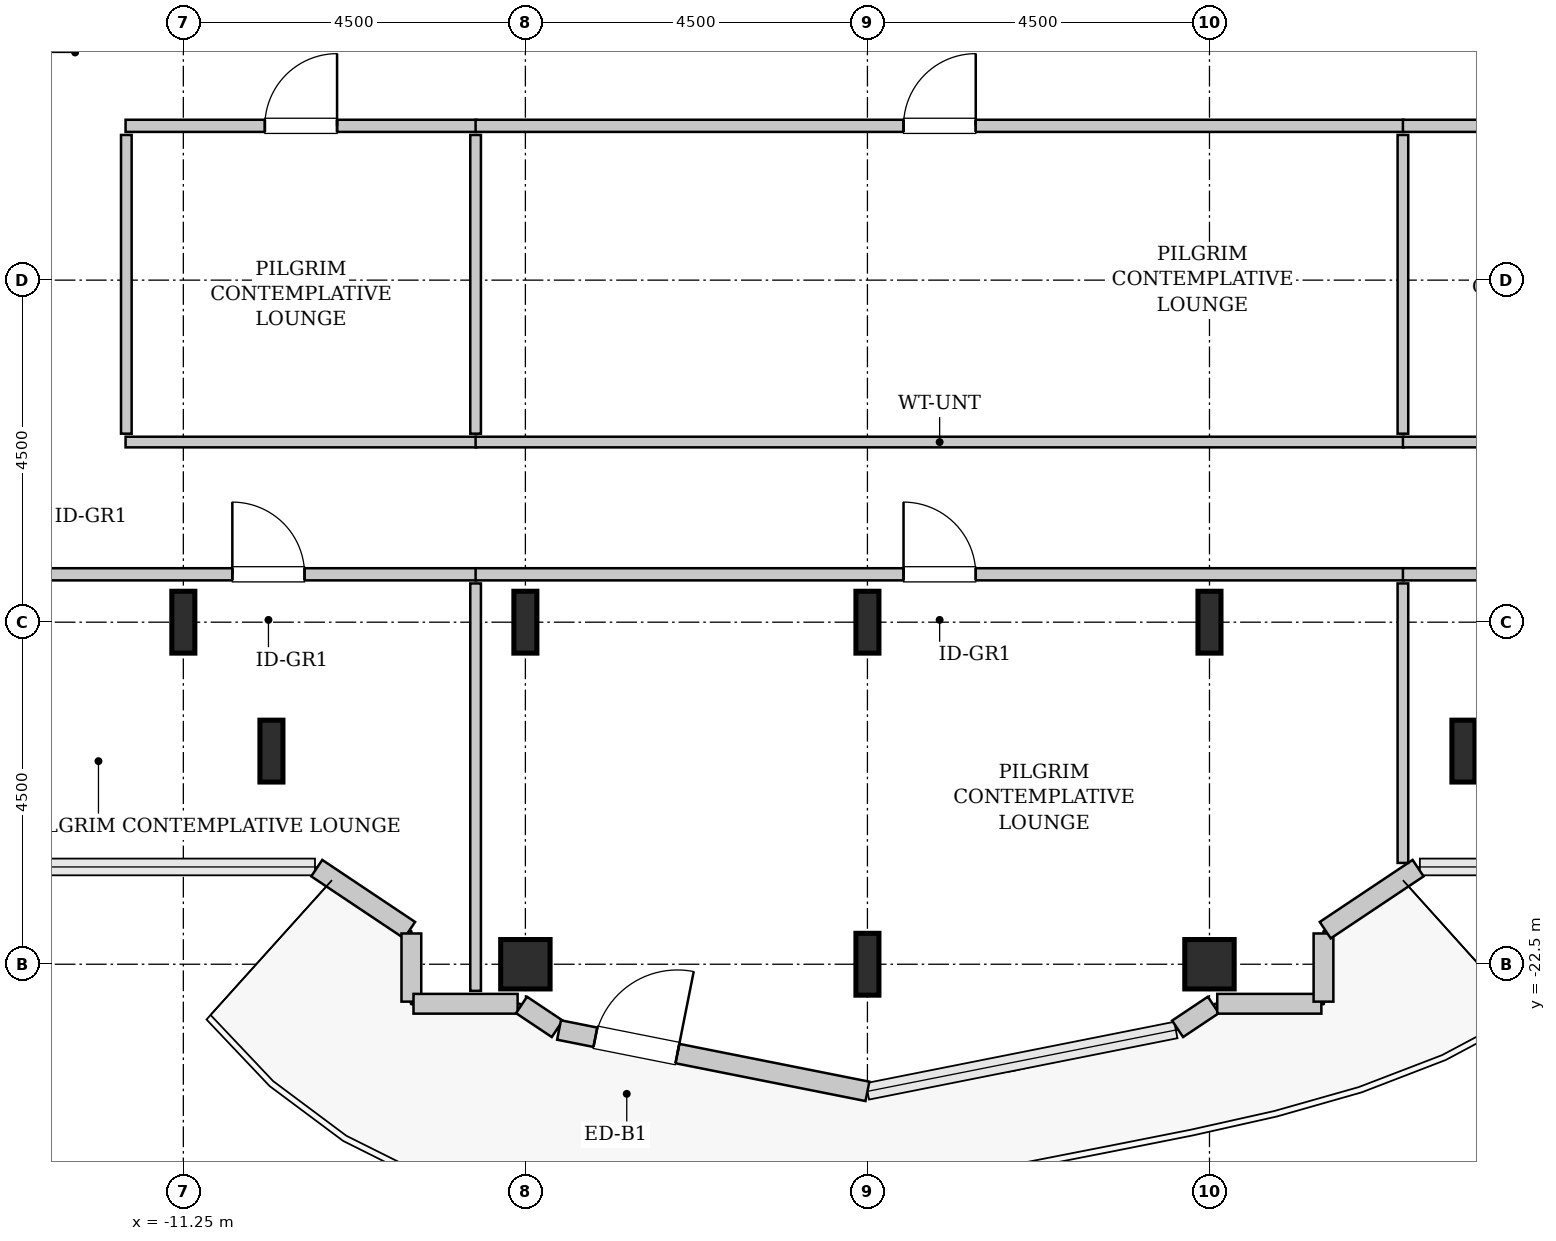
"""IFC4 building model, lengths in metres.
Left out: names, types, materials, properties, quantities, classifications, styles, units other than length and angle.
Written with IfcOpenShell. Run it as: python <this file> out.ifc"""

import sys

from ifc_helpers import new_model, si_unit, direction, frame, frame_2d, origin, origin_2d, place, context, subcontext, project, spatial, rectangle, hollow_rectangle, i_section, extrude, source, transform, mapped, element, fill, save


model = new_model("IFC4")
c1 = context("Model", 3, precision=1e-05, world=origin(), true_north=direction((0.0, 1.0)))
c2 = subcontext(c1, "Body", "Model", "MODEL_VIEW")
j1 = project(units=[si_unit("LENGTHUNIT", "METRE"), si_unit("PLANEANGLEUNIT", "RADIAN")], contexts=[c1])
p1 = place(None, origin())
s1 = spatial("IfcSite", under=j1, at=p1, CompositionType="ELEMENT")
p2 = place(p1, origin())
s2 = spatial("IfcBuilding", under=s1, at=p2, CompositionType="ELEMENT")
p3 = place(p2, frame((0.0, 0.0, 248.4)))
s3 = spatial("IfcBuildingStorey", under=s2, at=p3, CompositionType="ELEMENT", Elevation=248.4)
m1 = source(origin(), c2, "Body", "SweptSolid", [
    extrude(i_section(OverallWidth=0.303, OverallDepth=0.814, WebThickness=0.021, FlangeThickness=0.04, FilletRadius=0.03, at=origin_2d()), origin(), (0.0, 0.0, 1.0), 3.8),
])
for number, where, z_axis, x_axis in (
    (1, (-11.25, -18.0, 0.0), (0.0, 0.0, 1.0), (1.0, 0.0, 0.0)),
    (2, (-10.091, -19.696, 0.0), (0.0, 0.0, 1.0), (1.0, 0.0, 0.0)),
):
    element("IfcColumn", number, at=place(p3, frame(where, z_axis=z_axis, x_axis=x_axis)), inside=s3, PredefinedType="COLUMN", context=c2, shape_type="MappedRepresentation", body=[
        mapped(m1, transform((0.0, 0.0, 0.0), x_axis=(1.0, 0.0, 0.0), y_axis=(0.0, 1.0, 0.0), z_axis=(0.0, 0.0, 1.0), scale=1.0)),
    ])
m2 = source(origin(), c2, "Body", "SweptSolid", [
    extrude(hollow_rectangle(XDim=0.65, YDim=0.65, WallThickness=0.032, InnerFilletRadius=0.032, OuterFilletRadius=0.064, at=origin_2d()), origin(), (0.0, 0.0, 1.0), 3.8),
])
p4 = place(p3, frame((-6.75, -22.5, 0.0), z_axis=(0.0, 0.0, 1.0), x_axis=(1.0, 0.0, 0.0)))
e3 = element("IfcColumn", 3, at=p4, inside=s3, PredefinedType="COLUMN", context=c2, shape_type="MappedRepresentation", body=[
    mapped(m2, transform((0.0, 0.0, 0.0), x_axis=(1.0, 0.0, 0.0), y_axis=(0.0, 1.0, 0.0), z_axis=(0.0, 0.0, 1.0), scale=1.0)),
])
for number, where, z_axis, x_axis in (
    (4, (-6.75, -18.0, 0.0), (0.0, 0.0, 1.0), (1.0, 0.0, 0.0)),
    (5, (-2.25, -22.5, 0.0), (0.0, 0.0, 1.0), (1.0, 0.0, 0.0)),
    (6, (-2.25, -18.0, 0.0), (0.0, 0.0, 1.0), (1.0, 0.0, 0.0)),
):
    element("IfcColumn", number, at=place(p3, frame(where, z_axis=z_axis, x_axis=x_axis)), inside=s3, PredefinedType="COLUMN", context=c2, shape_type="MappedRepresentation", body=[
        mapped(m1, transform((0.0, 0.0, 0.0), x_axis=(1.0, 0.0, 0.0), y_axis=(0.0, 1.0, 0.0), z_axis=(0.0, 0.0, 1.0), scale=1.0)),
    ])
p5 = place(p3, frame((2.25, -22.5, 0.0), z_axis=(0.0, 0.0, 1.0), x_axis=(1.0, 0.0, 0.0)))
e7 = element("IfcColumn", 7, at=p5, inside=s3, PredefinedType="COLUMN", context=c2, shape_type="MappedRepresentation", body=[
    mapped(m2, transform((0.0, 0.0, 0.0), x_axis=(1.0, 0.0, 0.0), y_axis=(0.0, 1.0, 0.0), z_axis=(0.0, 0.0, 1.0), scale=1.0)),
])
for number, where, z_axis, x_axis in (
    (8, (2.25, -18.0, 0.0), (0.0, 0.0, 1.0), (1.0, 0.0, 0.0)),
    (9, (5.591, -19.696, 0.0), (0.0, 0.0, 1.0), (1.0, 0.0, 0.0)),
):
    element("IfcColumn", number, at=place(p3, frame(where, z_axis=z_axis, x_axis=x_axis)), inside=s3, PredefinedType="COLUMN", context=c2, shape_type="MappedRepresentation", body=[
        mapped(m1, transform((0.0, 0.0, 0.0), x_axis=(1.0, 0.0, 0.0), y_axis=(0.0, 1.0, 0.0), z_axis=(0.0, 0.0, 1.0), scale=1.0)),
    ])
m3 = source(origin(), c2, "Body", "SweptSolid", [
    extrude(rectangle(XDim=1.469, YDim=0.26, at=frame_2d((0.734, 0.0))), origin(), (0.0, 0.0, 1.0), 3.55),
])
p6 = place(p3, frame((-9.495, -21.236, 0.0), z_axis=(0.0, 0.0, 1.0), x_axis=(0.831461760506, -0.555581983884, 0.0)))
e10 = element("IfcWall", 10, at=p6, inside=s3, PredefinedType="SOLIDWALL", context=c2, shape_type="MappedRepresentation", body=[
    mapped(m3, transform((0.0, 0.0, 0.0), x_axis=(1.0, 0.0, 0.0), y_axis=(0.0, 1.0, 0.0), z_axis=(0.0, 0.0, 1.0), scale=1.0)),
])
m4 = source(origin(), c2, "Body", "SweptSolid", [
    extrude(rectangle(XDim=0.897, YDim=0.26, at=frame_2d((0.448, 0.0))), origin(), (0.0, 0.0, 1.0), 3.55),
])
p7 = place(p3, frame((-8.25, -22.095, 0.0), z_axis=(0.0, 0.0, 1.0), x_axis=(0.0, -1.0, 0.0)))
e11 = element("IfcWall", 11, at=p7, inside=s3, PredefinedType="SOLIDWALL", context=c2, shape_type="MappedRepresentation", body=[
    mapped(m4, transform((0.0, 0.0, 0.0), x_axis=(1.0, 0.0, 0.0), y_axis=(0.0, 1.0, 0.0), z_axis=(0.0, 0.0, 1.0), scale=1.0)),
])
m5 = source(origin(), c2, "Body", "SweptSolid", [
    extrude(rectangle(XDim=1.37, YDim=0.26, at=frame_2d((0.685, 0.0))), origin(), (0.0, 0.0, 1.0), 3.55),
])
p8 = place(p3, frame((-8.222, -23.02, 0.0), z_axis=(0.0, 0.0, 1.0), x_axis=(1.0, 0.0, 0.0)))
e12 = element("IfcWall", 12, at=p8, inside=s3, PredefinedType="SOLIDWALL", context=c2, shape_type="MappedRepresentation", body=[
    mapped(m5, transform((0.0, 0.0, 0.0), x_axis=(1.0, 0.0, 0.0), y_axis=(0.0, 1.0, 0.0), z_axis=(0.0, 0.0, 1.0), scale=1.0)),
])
m6 = source(origin(), c2, "Body", "SweptSolid", [
    extrude(rectangle(XDim=0.565, YDim=0.26, at=frame_2d((0.283, 0.0))), origin(), (0.0, 0.0, 1.0), 3.55),
])
p9 = place(p3, frame((-6.801, -23.036, 0.0), z_axis=(0.0, 0.0, 1.0), x_axis=(0.831651492666, -0.555297933317, 0.0)))
e13 = element("IfcWall", 13, at=p9, inside=s3, PredefinedType="SOLIDWALL", context=c2, shape_type="MappedRepresentation", body=[
    mapped(m6, transform((0.0, 0.0, 0.0), x_axis=(1.0, 0.0, 0.0), y_axis=(0.0, 1.0, 0.0), z_axis=(0.0, 0.0, 1.0), scale=1.0)),
])
m7 = source(origin(), c2, "Body", "SweptSolid", [
    extrude(rectangle(XDim=4.137, YDim=0.26, at=frame_2d((2.068, 0.0))), origin(), (0.0, 0.0, 1.0), 3.55),
])
p10 = place(p3, frame((-6.307, -23.365, 0.0), z_axis=(0.0, 0.0, 1.0), x_axis=(0.980782170794, -0.195105954428, 0.0)))
e14 = element("IfcWall", 14, at=p10, inside=s3, PredefinedType="SOLIDWALL", context=c2, shape_type="MappedRepresentation", body=[
    mapped(m7, transform((0.0, 0.0, 0.0), x_axis=(1.0, 0.0, 0.0), y_axis=(0.0, 1.0, 0.0), z_axis=(0.0, 0.0, 1.0), scale=1.0)),
])
p11 = place(p10, frame((0.488, 0.0, 0.0)))
e15 = element("IfcOpeningElement", 15, at=p11, cuts=e14, PredefinedType="OPENING", context=c2, shape_type="SweptSolid", body=[
    extrude(rectangle(XDim=1.1, YDim=2.2, at=frame_2d((0.55, 1.1))), frame((0.0, 0.14, 0.0), z_axis=(0.0, -1.0, 0.0), x_axis=(1.0, 0.0, 0.0)), (0.0, 0.0, 1.0), 0.28),
])
p12 = place(p3, frame((1.831, -23.35, 0.0), z_axis=(0.0, 0.0, 1.0), x_axis=(0.831651492666, 0.555297933317, 0.0)))
e16 = element("IfcWall", 16, at=p12, inside=s3, PredefinedType="SOLIDWALL", context=c2, shape_type="MappedRepresentation", body=[
    mapped(m6, transform((0.0, 0.0, 0.0), x_axis=(1.0, 0.0, 0.0), y_axis=(0.0, 1.0, 0.0), z_axis=(0.0, 0.0, 1.0), scale=1.0)),
])
p13 = place(p3, frame((2.352, -23.02, 0.0), z_axis=(0.0, 0.0, 1.0), x_axis=(1.0, 0.0, 0.0)))
e17 = element("IfcWall", 17, at=p13, inside=s3, PredefinedType="SOLIDWALL", context=c2, shape_type="MappedRepresentation", body=[
    mapped(m5, transform((0.0, 0.0, 0.0), x_axis=(1.0, 0.0, 0.0), y_axis=(0.0, 1.0, 0.0), z_axis=(0.0, 0.0, 1.0), scale=1.0)),
])
p14 = place(p3, frame((3.75, -22.992, 0.0), z_axis=(0.0, 0.0, 1.0), x_axis=(0.0, 1.0, 0.0)))
e18 = element("IfcWall", 18, at=p14, inside=s3, PredefinedType="SOLIDWALL", context=c2, shape_type="MappedRepresentation", body=[
    mapped(m4, transform((0.0, 0.0, 0.0), x_axis=(1.0, 0.0, 0.0), y_axis=(0.0, 1.0, 0.0), z_axis=(0.0, 0.0, 1.0), scale=1.0)),
])
p15 = place(p3, frame((3.773, -22.052, 0.0), z_axis=(0.0, 0.0, 1.0), x_axis=(0.831461760506, 0.555581983884, 0.0)))
e19 = element("IfcWall", 19, at=p15, inside=s3, PredefinedType="SOLIDWALL", context=c2, shape_type="MappedRepresentation", body=[
    mapped(m3, transform((0.0, 0.0, 0.0), x_axis=(1.0, 0.0, 0.0), y_axis=(0.0, 1.0, 0.0), z_axis=(0.0, 0.0, 1.0), scale=1.0)),
])
m8 = source(origin(), c2, "Body", "SweptSolid", [
    extrude(rectangle(XDim=6.225, YDim=0.16, at=frame_2d((3.113, 0.0))), origin(), (0.0, 0.0, 1.0), 3.535),
])
p16 = place(p3, frame((-13.62, -17.37, 0.0), z_axis=(0.0, 0.0, 1.0), x_axis=(1.0, 0.0, 0.0)))
e20 = element("IfcWall", 20, at=p16, inside=s3, PredefinedType="PARTITIONING", context=c2, shape_type="MappedRepresentation", body=[
    mapped(m8, transform((0.0, 0.0, 0.0), x_axis=(1.0, 0.0, 0.0), y_axis=(0.0, 1.0, 0.0), z_axis=(0.0, 0.0, 1.0), scale=1.0)),
])
p17 = place(p16, frame((3.015, 0.0, 0.0)))
e21 = element("IfcOpeningElement", 21, at=p17, cuts=e20, PredefinedType="OPENING", context=c2, shape_type="SweptSolid", body=[
    extrude(rectangle(XDim=0.95, YDim=2.1, at=frame_2d((0.475, 1.05))), frame((0.0, 0.09, 0.0), z_axis=(0.0, -1.0, 0.0), x_axis=(1.0, 0.0, 0.0)), (0.0, 0.0, 1.0), 0.18),
])
m9 = source(origin(), c2, "Body", "SweptSolid", [
    extrude(rectangle(XDim=5.36, YDim=0.14, at=frame_2d((2.68, 0.0))), origin(), (0.0, 0.0, 1.0), 3.535),
])
p18 = place(p3, frame((-7.405, -22.85, 0.0), z_axis=(0.0, 0.0, 1.0), x_axis=(0.0, 1.0, 0.0)))
e22 = element("IfcWall", 22, at=p18, inside=s3, PredefinedType="PARTITIONING", context=c2, shape_type="MappedRepresentation", body=[
    mapped(m9, transform((0.0, 0.0, 0.0), x_axis=(1.0, 0.0, 0.0), y_axis=(0.0, 1.0, 0.0), z_axis=(0.0, 0.0, 1.0), scale=1.0)),
])
m10 = source(origin(), c2, "Body", "SweptSolid", [
    extrude(rectangle(XDim=4.615, YDim=0.16, at=frame_2d((2.308, 0.0))), origin(), (0.0, 0.0, 1.0), 3.535),
])
p19 = place(p3, frame((-12.01, -11.47, 0.0), z_axis=(0.0, 0.0, 1.0), x_axis=(1.0, 0.0, 0.0)))
e23 = element("IfcWall", 23, at=p19, inside=s3, PredefinedType="PARTITIONING", context=c2, shape_type="MappedRepresentation", body=[
    mapped(m10, transform((0.0, 0.0, 0.0), x_axis=(1.0, 0.0, 0.0), y_axis=(0.0, 1.0, 0.0), z_axis=(0.0, 0.0, 1.0), scale=1.0)),
])
p20 = place(p19, frame((1.833, 0.0, 0.0)))
e24 = element("IfcOpeningElement", 24, at=p20, cuts=e23, PredefinedType="OPENING", context=c2, shape_type="SweptSolid", body=[
    extrude(rectangle(XDim=0.95, YDim=2.1, at=frame_2d((0.475, 1.05))), frame((0.0, 0.09, 0.0), z_axis=(0.0, -1.0, 0.0), x_axis=(1.0, 0.0, 0.0)), (0.0, 0.0, 1.0), 0.18),
])
m11 = source(origin(), c2, "Body", "SweptSolid", [
    extrude(rectangle(XDim=4.615, YDim=0.14, at=frame_2d((2.308, 0.0))), origin(), (0.0, 0.0, 1.0), 3.535),
])
p21 = place(p3, frame((-12.01, -15.63, 0.0), z_axis=(0.0, 0.0, 1.0), x_axis=(1.0, 0.0, 0.0)))
e25 = element("IfcWall", 25, at=p21, inside=s3, PredefinedType="PARTITIONING", context=c2, shape_type="MappedRepresentation", body=[
    mapped(m11, transform((0.0, 0.0, 0.0), x_axis=(1.0, 0.0, 0.0), y_axis=(0.0, 1.0, 0.0), z_axis=(0.0, 0.0, 1.0), scale=1.0)),
])
m12 = source(origin(), c2, "Body", "SweptSolid", [
    extrude(rectangle(XDim=3.93, YDim=0.14, at=frame_2d((1.965, 0.0))), origin(), (0.0, 0.0, 1.0), 3.535),
])
for number, where, z_axis, x_axis in (
    (26, (-12.0, -15.52, 0.0), (0.0, 0.0, 1.0), (0.0, 1.0, 0.0)),
    (27, (-7.405, -15.52, 0.0), (0.0, 0.0, 1.0), (0.0, 1.0, 0.0)),
):
    element("IfcWall", number, at=place(p3, frame(where, z_axis=z_axis, x_axis=x_axis)), inside=s3, PredefinedType="PARTITIONING", context=c2, shape_type="MappedRepresentation", body=[
        mapped(m12, transform((0.0, 0.0, 0.0), x_axis=(1.0, 0.0, 0.0), y_axis=(0.0, 1.0, 0.0), z_axis=(0.0, 0.0, 1.0), scale=1.0)),
    ])
m13 = source(origin(), c2, "Body", "SweptSolid", [
    extrude(rectangle(XDim=12.21, YDim=0.16, at=frame_2d((6.105, 0.0))), origin(), (0.0, 0.0, 1.0), 3.535),
])
p22 = place(p3, frame((-7.405, -17.37, 0.0), z_axis=(0.0, 0.0, 1.0), x_axis=(1.0, 0.0, 0.0)))
e28 = element("IfcWall", 28, at=p22, inside=s3, PredefinedType="PARTITIONING", context=c2, shape_type="MappedRepresentation", body=[
    mapped(m13, transform((0.0, 0.0, 0.0), x_axis=(1.0, 0.0, 0.0), y_axis=(0.0, 1.0, 0.0), z_axis=(0.0, 0.0, 1.0), scale=1.0)),
])
p23 = place(p22, frame((5.63, 0.0, 0.0)))
e29 = element("IfcOpeningElement", 29, at=p23, cuts=e28, PredefinedType="OPENING", context=c2, shape_type="SweptSolid", body=[
    extrude(rectangle(XDim=0.95, YDim=2.1, at=frame_2d((0.475, 1.05))), frame((0.0, 0.09, 0.0), z_axis=(0.0, -1.0, 0.0), x_axis=(1.0, 0.0, 0.0)), (0.0, 0.0, 1.0), 0.18),
])
m14 = source(origin(), c2, "Body", "SweptSolid", [
    extrude(rectangle(XDim=3.677, YDim=0.14, at=frame_2d((1.838, 0.0))), origin(), (0.0, 0.0, 1.0), 3.535),
])
p24 = place(p3, frame((4.795, -21.167, 0.0), z_axis=(0.0, 0.0, 1.0), x_axis=(0.0, 1.0, 0.0)))
e30 = element("IfcWall", 30, at=p24, inside=s3, PredefinedType="PARTITIONING", context=c2, shape_type="MappedRepresentation", body=[
    mapped(m14, transform((0.0, 0.0, 0.0), x_axis=(1.0, 0.0, 0.0), y_axis=(0.0, 1.0, 0.0), z_axis=(0.0, 0.0, 1.0), scale=1.0)),
])
p25 = place(p3, frame((-7.405, -11.47, 0.0), z_axis=(0.0, 0.0, 1.0), x_axis=(1.0, 0.0, 0.0)))
e31 = element("IfcWall", 31, at=p25, inside=s3, PredefinedType="PARTITIONING", context=c2, shape_type="MappedRepresentation", body=[
    mapped(m13, transform((0.0, 0.0, 0.0), x_axis=(1.0, 0.0, 0.0), y_axis=(0.0, 1.0, 0.0), z_axis=(0.0, 0.0, 1.0), scale=1.0)),
])
p26 = place(p25, frame((5.63, 0.0, 0.0)))
e32 = element("IfcOpeningElement", 32, at=p26, cuts=e31, PredefinedType="OPENING", context=c2, shape_type="SweptSolid", body=[
    extrude(rectangle(XDim=0.95, YDim=2.1, at=frame_2d((0.475, 1.05))), frame((0.0, 0.09, 0.0), z_axis=(0.0, -1.0, 0.0), x_axis=(1.0, 0.0, 0.0)), (0.0, 0.0, 1.0), 0.18),
])
m15 = source(origin(), c2, "Body", "SweptSolid", [
    extrude(rectangle(XDim=12.21, YDim=0.14, at=frame_2d((6.105, 0.0))), origin(), (0.0, 0.0, 1.0), 3.535),
])
p27 = place(p3, frame((-7.405, -15.63, 0.0), z_axis=(0.0, 0.0, 1.0), x_axis=(1.0, 0.0, 0.0)))
e33 = element("IfcWall", 33, at=p27, inside=s3, PredefinedType="PARTITIONING", context=c2, shape_type="MappedRepresentation", body=[
    mapped(m15, transform((0.0, 0.0, 0.0), x_axis=(1.0, 0.0, 0.0), y_axis=(0.0, 1.0, 0.0), z_axis=(0.0, 0.0, 1.0), scale=1.0)),
])
p28 = place(p3, frame((4.795, -15.52, 0.0), z_axis=(0.0, 0.0, 1.0), x_axis=(0.0, 1.0, 0.0)))
e34 = element("IfcWall", 34, at=p28, inside=s3, PredefinedType="PARTITIONING", context=c2, shape_type="MappedRepresentation", body=[
    mapped(m12, transform((0.0, 0.0, 0.0), x_axis=(1.0, 0.0, 0.0), y_axis=(0.0, 1.0, 0.0), z_axis=(0.0, 0.0, 1.0), scale=1.0)),
])
m16 = source(origin(), c2, "Body", "SweptSolid", [
    extrude(rectangle(XDim=8.825, YDim=0.16, at=frame_2d((4.413, 0.0))), origin(), (0.0, 0.0, 1.0), 3.535),
])
p29 = place(p3, frame((4.795, -17.37, 0.0), z_axis=(0.0, 0.0, 1.0), x_axis=(1.0, 0.0, 0.0)))
e35 = element("IfcWall", 35, at=p29, inside=s3, PredefinedType="PARTITIONING", context=c2, shape_type="MappedRepresentation", body=[
    mapped(m16, transform((0.0, 0.0, 0.0), x_axis=(1.0, 0.0, 0.0), y_axis=(0.0, 1.0, 0.0), z_axis=(0.0, 0.0, 1.0), scale=1.0)),
])
p30 = place(p29, frame((3.938, 0.0, 0.0)))
e36 = element("IfcOpeningElement", 36, at=p30, cuts=e35, PredefinedType="OPENING", context=c2, shape_type="SweptSolid", body=[
    extrude(rectangle(XDim=0.95, YDim=2.1, at=frame_2d((0.475, 1.05))), frame((0.0, 0.09, 0.0), z_axis=(0.0, -1.0, 0.0), x_axis=(1.0, 0.0, 0.0)), (0.0, 0.0, 1.0), 0.18),
])
m17 = source(origin(), c2, "Body", "SweptSolid", [
    extrude(rectangle(XDim=7.215, YDim=0.16, at=frame_2d((3.607, 0.0))), origin(), (0.0, 0.0, 1.0), 3.535),
])
p31 = place(p3, frame((4.795, -11.47, 0.0), z_axis=(0.0, 0.0, 1.0), x_axis=(1.0, 0.0, 0.0)))
e37 = element("IfcWall", 37, at=p31, inside=s3, PredefinedType="PARTITIONING", context=c2, shape_type="MappedRepresentation", body=[
    mapped(m17, transform((0.0, 0.0, 0.0), x_axis=(1.0, 0.0, 0.0), y_axis=(0.0, 1.0, 0.0), z_axis=(0.0, 0.0, 1.0), scale=1.0)),
])
p32 = place(p31, frame((3.133, 0.0, 0.0)))
e38 = element("IfcOpeningElement", 38, at=p32, cuts=e37, PredefinedType="OPENING", context=c2, shape_type="SweptSolid", body=[
    extrude(rectangle(XDim=0.95, YDim=2.1, at=frame_2d((0.475, 1.05))), frame((0.0, 0.09, 0.0), z_axis=(0.0, -1.0, 0.0), x_axis=(1.0, 0.0, 0.0)), (0.0, 0.0, 1.0), 0.18),
])
m18 = source(origin(), c2, "Body", "SweptSolid", [
    extrude(rectangle(XDim=7.215, YDim=0.14, at=frame_2d((3.607, 0.0))), origin(), (0.0, 0.0, 1.0), 3.535),
])
p33 = place(p3, frame((4.795, -15.63, 0.0), z_axis=(0.0, 0.0, 1.0), x_axis=(1.0, 0.0, 0.0)))
e39 = element("IfcWall", 39, at=p33, inside=s3, PredefinedType="PARTITIONING", context=c2, shape_type="MappedRepresentation", body=[
    mapped(m18, transform((0.0, 0.0, 0.0), x_axis=(1.0, 0.0, 0.0), y_axis=(0.0, 1.0, 0.0), z_axis=(0.0, 0.0, 1.0), scale=1.0)),
])
m19 = source(origin(), c2, "Body", "SweptSolid", [
    extrude(rectangle(XDim=1.1, YDim=2.2, at=frame_2d((0.55, 1.1))), frame((0.0, 0.025, 0.0), z_axis=(0.0, -1.0, 0.0), x_axis=(1.0, 0.0, 0.0)), (0.0, 0.0, 1.0), 0.05),
])
p34 = place(p11, origin())
e40 = element("IfcDoor", 40, at=p34, inside=s3, OperationType="SINGLE_SWING_RIGHT", PredefinedType="DOOR", context=c2, shape_type="MappedRepresentation", body=[
    mapped(m19, transform((0.0, 0.0, 0.0), x_axis=(1.0, 0.0, 0.0), y_axis=(0.0, 1.0, 0.0), z_axis=(0.0, 0.0, 1.0), scale=1.0)),
])
fill(e15, e40)
m20 = source(origin(), c2, "Body", "SweptSolid", [
    extrude(rectangle(XDim=0.95, YDim=2.1, at=frame_2d((0.475, 1.05))), frame((0.0, 0.025, 0.0), z_axis=(0.0, -1.0, 0.0), x_axis=(1.0, 0.0, 0.0)), (0.0, 0.0, 1.0), 0.05),
])
p35 = place(p17, origin())
e41 = element("IfcDoor", 41, at=p35, inside=s3, OperationType="SINGLE_SWING_LEFT", PredefinedType="DOOR", context=c2, shape_type="MappedRepresentation", body=[
    mapped(m20, transform((0.0, 0.0, 0.0), x_axis=(1.0, 0.0, 0.0), y_axis=(0.0, 1.0, 0.0), z_axis=(0.0, 0.0, 1.0), scale=1.0)),
])
fill(e21, e41)
p36 = place(p20, origin())
e42 = element("IfcDoor", 42, at=p36, inside=s3, OperationType="SINGLE_SWING_RIGHT", PredefinedType="DOOR", context=c2, shape_type="MappedRepresentation", body=[
    mapped(m20, transform((0.0, 0.0, 0.0), x_axis=(1.0, 0.0, 0.0), y_axis=(0.0, 1.0, 0.0), z_axis=(0.0, 0.0, 1.0), scale=1.0)),
])
fill(e24, e42)
p37 = place(p23, origin())
e43 = element("IfcDoor", 43, at=p37, inside=s3, OperationType="SINGLE_SWING_LEFT", PredefinedType="DOOR", context=c2, shape_type="MappedRepresentation", body=[
    mapped(m20, transform((0.0, 0.0, 0.0), x_axis=(1.0, 0.0, 0.0), y_axis=(0.0, 1.0, 0.0), z_axis=(0.0, 0.0, 1.0), scale=1.0)),
])
fill(e29, e43)
p38 = place(p26, origin())
e44 = element("IfcDoor", 44, at=p38, inside=s3, OperationType="SINGLE_SWING_RIGHT", PredefinedType="DOOR", context=c2, shape_type="MappedRepresentation", body=[
    mapped(m20, transform((0.0, 0.0, 0.0), x_axis=(1.0, 0.0, 0.0), y_axis=(0.0, 1.0, 0.0), z_axis=(0.0, 0.0, 1.0), scale=1.0)),
])
fill(e32, e44)
save(model, sys.argv[1])
